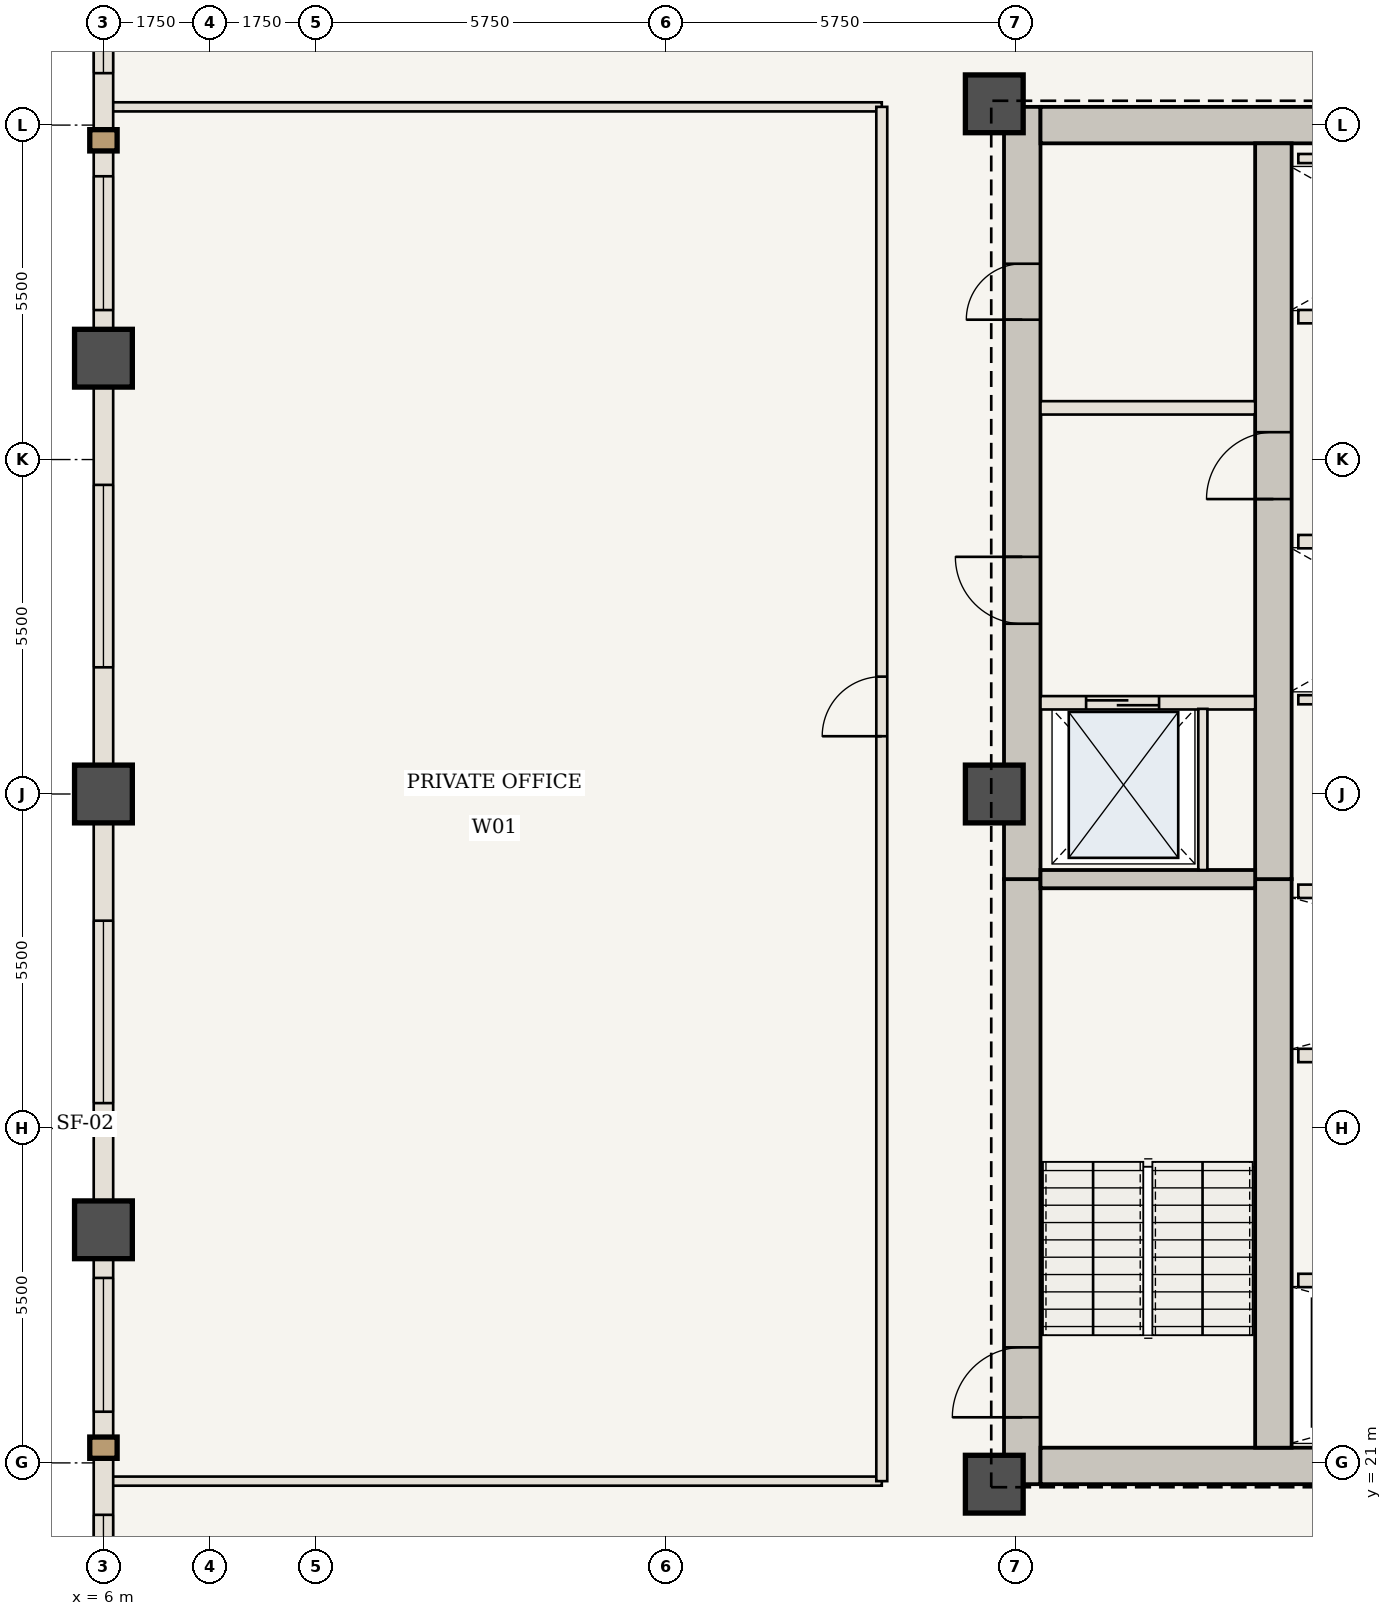
"""IFC4 building model, lengths in metres.
Left out: names, types, materials, properties, quantities, classifications, styles, units other than length and angle.
Written with IfcOpenShell. Run it as: python <this file> out.ifc"""

import sys

from ifc_helpers import new_model, si_unit, direction, frame, frame_2d, origin, origin_2d, place, context, subcontext, project, spatial, rectangle, extrude, element, fill, save


model = new_model("IFC4")
c1 = context("Model", 3, precision=1e-05, world=origin(), true_north=direction((0.0, 1.0)))
c2 = subcontext(c1, "Body", "Model", "MODEL_VIEW")
j1 = project(units=[si_unit("LENGTHUNIT", "METRE"), si_unit("PLANEANGLEUNIT", "RADIAN")], contexts=[c1])
p1 = place(None, origin())
s1 = spatial("IfcSite", under=j1, at=p1, CompositionType="ELEMENT")
p2 = place(p1, origin())
s2 = spatial("IfcBuilding", under=s1, at=p2, CompositionType="ELEMENT")
p3 = place(p2, frame((0.0, 0.0, 156.8)))
s3 = spatial("IfcBuildingStorey", under=s2, at=p3, CompositionType="ELEMENT", Elevation=156.8)
p4 = place(p3, frame((21.11, 20.65, 0.0), z_axis=(0.0, 0.0, 1.0), x_axis=(0.0, 1.0, 0.0)))
e1 = element("IfcWall", 1, at=p4, inside=s3, PredefinedType="SHEAR", context=c2, shape_type="SweptSolid", body=[
    extrude(rectangle(XDim=9.95, YDim=0.6, at=frame_2d((4.975, 0.0))), origin(), (0.0, 0.0, 1.0), 3.85),
])
p5 = place(p4, frame((1.1, 0.0, 0.0)))
e2 = element("IfcOpeningElement", 2, at=p5, cuts=e1, PredefinedType="OPENING", context=c2, shape_type="SweptSolid", body=[
    extrude(rectangle(XDim=1.15, YDim=2.15, at=frame_2d((0.575, 1.075))), frame((0.0, 0.31, 0.0), z_axis=(0.0, -1.0, 0.0), x_axis=(1.0, 0.0, 0.0)), (0.0, 0.0, 1.0), 0.62),
])
p6 = place(p3, frame((21.11, 30.6, 0.0), z_axis=(0.0, 0.0, 1.0), x_axis=(0.0, 1.0, 0.0)))
e3 = element("IfcWall", 3, at=p6, inside=s3, PredefinedType="SHEAR", context=c2, shape_type="SweptSolid", body=[
    extrude(rectangle(XDim=12.7, YDim=0.6, at=frame_2d((6.35, 0.0))), origin(), (0.0, 0.0, 1.0), 3.85),
])
p7 = place(p6, frame((4.2, 0.0, 0.0)))
e4 = element("IfcOpeningElement", 4, at=p7, cuts=e3, PredefinedType="OPENING", context=c2, shape_type="SweptSolid", body=[
    extrude(rectangle(XDim=1.1, YDim=2.15, at=frame_2d((0.55, 1.075))), frame((0.0, 0.31, 0.0), z_axis=(0.0, -1.0, 0.0), x_axis=(1.0, 0.0, 0.0)), (0.0, 0.0, 1.0), 0.62),
])
p8 = place(p6, frame((9.2, 0.0, 0.0)))
e5 = element("IfcOpeningElement", 5, at=p8, cuts=e3, PredefinedType="OPENING", context=c2, shape_type="SweptSolid", body=[
    extrude(rectangle(XDim=0.92, YDim=2.1, at=frame_2d((0.46, 1.05))), frame((0.0, 0.31, 0.0), z_axis=(0.0, -1.0, 0.0), x_axis=(1.0, 0.0, 0.0)), (0.0, 0.0, 1.0), 0.62),
])
p9 = place(p3, frame((21.41, 20.95, 0.0), z_axis=(0.0, 0.0, 1.0), x_axis=(1.0, 0.0, 0.0)))
e6 = element("IfcWall", 6, at=p9, inside=s3, PredefinedType="SHEAR", context=c2, shape_type="SweptSolid", body=[
    extrude(rectangle(XDim=13.74, YDim=0.6, at=frame_2d((6.87, 0.0))), origin(), (0.0, 0.0, 1.0), 3.85),
])
p10 = place(p3, frame((21.41, 43.0, 0.0), z_axis=(0.0, 0.0, 1.0), x_axis=(1.0, 0.0, 0.0)))
e7 = element("IfcWall", 7, at=p10, inside=s3, PredefinedType="SHEAR", context=c2, shape_type="SweptSolid", body=[
    extrude(rectangle(XDim=8.24, YDim=0.6, at=frame_2d((4.12, 0.0))), origin(), (0.0, 0.0, 1.0), 3.85),
])
p11 = place(p3, frame((25.24, 21.25, 0.0), z_axis=(0.0, 0.0, 1.0), x_axis=(0.0, 1.0, 0.0)))
e8 = element("IfcWall", 8, at=p11, inside=s3, PredefinedType="SHEAR", context=c2, shape_type="SweptSolid", body=[
    extrude(rectangle(XDim=9.35, YDim=0.6, at=frame_2d((4.675, 0.0))), origin(), (0.0, 0.0, 1.0), 3.85),
])
p12 = place(p3, frame((25.24, 30.6, 0.0), z_axis=(0.0, 0.0, 1.0), x_axis=(0.0, 1.0, 0.0)))
e9 = element("IfcWall", 9, at=p12, inside=s3, PredefinedType="SHEAR", context=c2, shape_type="SweptSolid", body=[
    extrude(rectangle(XDim=12.1, YDim=0.6, at=frame_2d((6.05, 0.0))), origin(), (0.0, 0.0, 1.0), 3.85),
])
p13 = place(p12, frame((6.25, 0.0, 0.0)))
e10 = element("IfcOpeningElement", 10, at=p13, cuts=e9, PredefinedType="OPENING", context=c2, shape_type="SweptSolid", body=[
    extrude(rectangle(XDim=1.1, YDim=2.15, at=frame_2d((0.55, 1.075))), frame((0.0, 0.31, 0.0), z_axis=(0.0, -1.0, 0.0), x_axis=(1.0, 0.0, 0.0)), (0.0, 0.0, 1.0), 0.62),
])
for number, where, z_axis, x_axis in (
    (11, (20.65, 20.65, 0.0), (0.0, 0.0, 1.0), (1.0, 0.0, 0.0)),
    (12, (20.65, 43.35, 0.0), (0.0, 0.0, 1.0), (1.0, 0.0, 0.0)),
    (13, (20.65, 32.0, 0.0), (0.0, 0.0, 1.0), (1.0, 0.0, 0.0)),
    (14, (6.0, 24.833, 0.0), (0.0, 0.0, 1.0), (1.0, 0.0, 0.0)),
    (15, (6.0, 32.0, 0.0), (0.0, 0.0, 1.0), (1.0, 0.0, 0.0)),
    (16, (6.0, 39.167, 0.0), (0.0, 0.0, 1.0), (1.0, 0.0, 0.0)),
):
    element("IfcColumn", number, at=place(p3, frame(where, z_axis=z_axis, x_axis=x_axis)), inside=s3, PredefinedType="COLUMN", context=c2, shape_type="SweptSolid", body=[
        extrude(rectangle(XDim=0.95, YDim=0.95, at=origin_2d()), origin(), (0.0, 0.0, 1.0), 3.85),
    ])
p14 = place(p3, frame((21.41, 30.6, 0.0), z_axis=(0.0, 0.0, 1.0), x_axis=(1.0, 0.0, 0.0)))
e17 = element("IfcWall", 17, at=p14, inside=s3, PredefinedType="SHEAR", context=c2, shape_type="SweptSolid", body=[
    extrude(rectangle(XDim=3.53, YDim=0.3, at=frame_2d((1.765, 0.0))), origin(), (0.0, 0.0, 1.0), 3.685),
])
p15 = place(p3, frame((21.41, 33.5, 0.0), z_axis=(0.0, 0.0, 1.0), x_axis=(1.0, 0.0, 0.0)))
e18 = element("IfcWall", 18, at=p15, inside=s3, PredefinedType="STANDARD", context=c2, shape_type="SweptSolid", body=[
    extrude(rectangle(XDim=3.53, YDim=0.22, at=frame_2d((1.765, 0.0))), origin(), (0.0, 0.0, 1.0), 3.685),
])
p16 = place(p15, frame((0.75, 0.0, 0.0)))
e19 = element("IfcOpeningElement", 19, at=p16, cuts=e18, PredefinedType="OPENING", context=c2, shape_type="SweptSolid", body=[
    extrude(rectangle(XDim=1.2, YDim=2.2, at=frame_2d((0.6, 1.1))), frame((0.0, 0.12, 0.0), z_axis=(0.0, -1.0, 0.0), x_axis=(1.0, 0.0, 0.0)), (0.0, 0.0, 1.0), 0.24),
])
p17 = place(p3, frame((24.08, 30.75, 0.0), z_axis=(0.0, 0.0, 1.0), x_axis=(0.0, 1.0, 0.0)))
e20 = element("IfcWall", 20, at=p17, inside=s3, PredefinedType="STANDARD", context=c2, shape_type="SweptSolid", body=[
    extrude(rectangle(XDim=2.65, YDim=0.15, at=frame_2d((1.325, 0.0))), origin(), (0.0, 0.0, 1.0), 3.685),
])
p18 = place(p3, frame((21.41, 38.35, 0.0), z_axis=(0.0, 0.0, 1.0), x_axis=(1.0, 0.0, 0.0)))
e21 = element("IfcWall", 21, at=p18, inside=s3, PredefinedType="STANDARD", context=c2, shape_type="SweptSolid", body=[
    extrude(rectangle(XDim=3.53, YDim=0.22, at=frame_2d((1.765, 0.0))), origin(), (0.0, 0.0, 1.0), 3.685),
])
p19 = place(p3, frame((25.65, 24.0, 0.0), z_axis=(0.0, 0.0, 1.0), x_axis=(1.0, 0.0, 0.0)))
e22 = element("IfcWall", 22, at=p19, inside=s3, PredefinedType="STANDARD", context=c2, shape_type="SweptSolid", body=[
    extrude(rectangle(XDim=9.25, YDim=0.22, at=frame_2d((4.625, 0.0))), origin(), (0.0, 0.0, 1.0), 3.685),
])
p20 = place(p19, frame((0.58, 0.0, 0.0)))
e23 = element("IfcOpeningElement", 23, at=p20, cuts=e22, PredefinedType="OPENING", context=c2, shape_type="SweptSolid", body=[
    extrude(rectangle(XDim=1.1, YDim=2.15, at=frame_2d((0.55, 1.075))), frame((0.0, 0.12, 0.0), z_axis=(0.0, -1.0, 0.0), x_axis=(1.0, 0.0, 0.0)), (0.0, 0.0, 1.0), 0.24),
])
p21 = place(p19, frame((2.75, 0.0, 0.0)))
e24 = element("IfcOpeningElement", 24, at=p21, cuts=e22, PredefinedType="OPENING", context=c2, shape_type="SweptSolid", body=[
    extrude(rectangle(XDim=1.1, YDim=2.15, at=frame_2d((0.55, 1.075))), frame((0.0, 0.12, 0.0), z_axis=(0.0, -1.0, 0.0), x_axis=(1.0, 0.0, 0.0)), (0.0, 0.0, 1.0), 0.24),
])
p22 = place(p19, frame((5.05, 0.0, 0.0)))
e25 = element("IfcOpeningElement", 25, at=p22, cuts=e22, PredefinedType="OPENING", context=c2, shape_type="SweptSolid", body=[
    extrude(rectangle(XDim=1.1, YDim=2.15, at=frame_2d((0.55, 1.075))), frame((0.0, 0.12, 0.0), z_axis=(0.0, -1.0, 0.0), x_axis=(1.0, 0.0, 0.0)), (0.0, 0.0, 1.0), 0.24),
])
p23 = place(p19, frame((7.35, 0.0, 0.0)))
e26 = element("IfcOpeningElement", 26, at=p23, cuts=e22, PredefinedType="OPENING", context=c2, shape_type="SweptSolid", body=[
    extrude(rectangle(XDim=1.1, YDim=2.15, at=frame_2d((0.55, 1.075))), frame((0.0, 0.12, 0.0), z_axis=(0.0, -1.0, 0.0), x_axis=(1.0, 0.0, 0.0)), (0.0, 0.0, 1.0), 0.24),
])
for number, where, z_axis, x_axis in (
    (27, (25.65, 27.7, 0.0), (0.0, 0.0, 1.0), (1.0, 0.0, 0.0)),
    (28, (25.65, 30.4, 0.0), (0.0, 0.0, 1.0), (1.0, 0.0, 0.0)),
):
    element("IfcWall", number, at=place(p3, frame(where, z_axis=z_axis, x_axis=x_axis)), inside=s3, PredefinedType="STANDARD", context=c2, shape_type="SweptSolid", body=[
        extrude(rectangle(XDim=9.25, YDim=0.22, at=frame_2d((4.625, 0.0))), origin(), (0.0, 0.0, 1.0), 3.685),
    ])
p24 = place(p3, frame((25.65, 36.15, 0.0), z_axis=(0.0, 0.0, 1.0), x_axis=(1.0, 0.0, 0.0)))
e29 = element("IfcWall", 29, at=p24, inside=s3, PredefinedType="STANDARD", context=c2, shape_type="SweptSolid", body=[
    extrude(rectangle(XDim=4.3, YDim=0.22, at=frame_2d((2.15, 0.0))), origin(), (0.0, 0.0, 1.0), 3.685),
])
p25 = place(p3, frame((25.65, 33.55, 0.0), z_axis=(0.0, 0.0, 1.0), x_axis=(1.0, 0.0, 0.0)))
e30 = element("IfcWall", 30, at=p25, inside=s3, PredefinedType="STANDARD", context=c2, shape_type="SweptSolid", body=[
    extrude(rectangle(XDim=4.2, YDim=0.15, at=frame_2d((2.1, 0.0))), origin(), (0.0, 0.0, 1.0), 3.685),
])
p26 = place(p3, frame((25.65, 39.85, 0.0), z_axis=(0.0, 0.0, 1.0), x_axis=(1.0, 0.0, 0.0)))
e31 = element("IfcWall", 31, at=p26, inside=s3, PredefinedType="STANDARD", context=c2, shape_type="SweptSolid", body=[
    extrude(rectangle(XDim=4.3, YDim=0.22, at=frame_2d((2.15, 0.0))), origin(), (0.0, 0.0, 1.0), 3.685),
])
p27 = place(p3, frame((25.65, 42.45, 0.0), z_axis=(0.0, 0.0, 1.0), x_axis=(1.0, 0.0, 0.0)))
e32 = element("IfcWall", 32, at=p27, inside=s3, PredefinedType="STANDARD", context=c2, shape_type="SweptSolid", body=[
    extrude(rectangle(XDim=4.2, YDim=0.15, at=frame_2d((2.1, 0.0))), origin(), (0.0, 0.0, 1.0), 3.685),
])
for number, where, z_axis, x_axis in (
    (33, (6.06, 20.7, 0.0), (0.0, 0.0, 1.0), (1.0, 0.0, 0.0)),
    (34, (6.06, 43.3, 0.0), (0.0, 0.0, 1.0), (1.0, 0.0, 0.0)),
):
    element("IfcWall", number, at=place(p3, frame(where, z_axis=z_axis, x_axis=x_axis)), inside=s3, PredefinedType="STANDARD", context=c2, shape_type="SweptSolid", body=[
        extrude(rectangle(XDim=12.74, YDim=0.15, at=frame_2d((6.37, 0.0))), origin(), (0.0, 0.0, 1.0), 3.065),
    ])
p28 = place(p3, frame((18.8, 20.7, 0.0), z_axis=(0.0, 0.0, 1.0), x_axis=(0.0, 1.0, 0.0)))
e35 = element("IfcWall", 35, at=p28, inside=s3, PredefinedType="STANDARD", context=c2, shape_type="SweptSolid", body=[
    extrude(rectangle(XDim=22.6, YDim=0.18, at=frame_2d((11.3, 0.0))), origin(), (0.0, 0.0, 1.0), 3.685),
])
p29 = place(p28, frame((12.25, 0.0, 0.0)))
e36 = element("IfcOpeningElement", 36, at=p29, cuts=e35, PredefinedType="OPENING", context=c2, shape_type="SweptSolid", body=[
    extrude(rectangle(XDim=0.98, YDim=2.2, at=frame_2d((0.49, 1.1))), frame((0.0, 0.1, 0.0), z_axis=(0.0, -1.0, 0.0), x_axis=(1.0, 0.0, 0.0)), (0.0, 0.0, 1.0), 0.2),
])
p30 = place(p3, frame((6.0, 17.667, 0.0), z_axis=(0.0, 0.0, 1.0), x_axis=(0.0, 1.0, 0.0)))
e37 = element("IfcWall", 37, at=p30, inside=s3, PredefinedType="USERDEFINED", context=c2, shape_type="SweptSolid", body=[
    extrude(rectangle(XDim=7.167, YDim=0.32, at=frame_2d((3.583, 0.0))), origin(), (0.0, 0.0, 1.0), 2.885),
])
p31 = place(p30, frame((0.879, 0.0, 0.85)))
e38 = element("IfcOpeningElement", 38, at=p31, cuts=e37, PredefinedType="OPENING", context=c2, shape_type="SweptSolid", body=[
    extrude(rectangle(XDim=1.6, YDim=1.835, at=frame_2d((0.8, 0.917))), frame((0.0, 0.17, 0.0), z_axis=(0.0, -1.0, 0.0), x_axis=(1.0, 0.0, 0.0)), (0.0, 0.0, 1.0), 0.34),
])
p32 = place(p30, frame((4.175, 0.0, 0.85)))
e39 = element("IfcOpeningElement", 39, at=p32, cuts=e37, PredefinedType="OPENING", context=c2, shape_type="SweptSolid", body=[
    extrude(rectangle(XDim=2.2, YDim=1.835, at=frame_2d((1.1, 0.917))), frame((0.0, 0.17, 0.0), z_axis=(0.0, -1.0, 0.0), x_axis=(1.0, 0.0, 0.0)), (0.0, 0.0, 1.0), 0.34),
])
p33 = place(p3, frame((6.0, 24.833, 0.0), z_axis=(0.0, 0.0, 1.0), x_axis=(0.0, 1.0, 0.0)))
e40 = element("IfcWall", 40, at=p33, inside=s3, PredefinedType="USERDEFINED", context=c2, shape_type="SweptSolid", body=[
    extrude(rectangle(XDim=7.167, YDim=0.32, at=frame_2d((3.583, 0.0))), origin(), (0.0, 0.0, 1.0), 2.885),
])
p34 = place(p33, frame((2.083, 0.0, 0.85)))
e41 = element("IfcOpeningElement", 41, at=p34, cuts=e40, PredefinedType="OPENING", context=c2, shape_type="SweptSolid", body=[
    extrude(rectangle(XDim=3.0, YDim=1.835, at=frame_2d((1.5, 0.917))), frame((0.0, 0.17, 0.0), z_axis=(0.0, -1.0, 0.0), x_axis=(1.0, 0.0, 0.0)), (0.0, 0.0, 1.0), 0.34),
])
p35 = place(p3, frame((6.0, 32.0, 0.0), z_axis=(0.0, 0.0, 1.0), x_axis=(0.0, 1.0, 0.0)))
e42 = element("IfcWall", 42, at=p35, inside=s3, PredefinedType="USERDEFINED", context=c2, shape_type="SweptSolid", body=[
    extrude(rectangle(XDim=7.167, YDim=0.32, at=frame_2d((3.583, 0.0))), origin(), (0.0, 0.0, 1.0), 2.885),
])
p36 = place(p35, frame((2.083, 0.0, 0.85)))
e43 = element("IfcOpeningElement", 43, at=p36, cuts=e42, PredefinedType="OPENING", context=c2, shape_type="SweptSolid", body=[
    extrude(rectangle(XDim=3.0, YDim=1.835, at=frame_2d((1.5, 0.917))), frame((0.0, 0.17, 0.0), z_axis=(0.0, -1.0, 0.0), x_axis=(1.0, 0.0, 0.0)), (0.0, 0.0, 1.0), 0.34),
])
p37 = place(p3, frame((6.0, 39.167, 0.0), z_axis=(0.0, 0.0, 1.0), x_axis=(0.0, 1.0, 0.0)))
e44 = element("IfcWall", 44, at=p37, inside=s3, PredefinedType="USERDEFINED", context=c2, shape_type="SweptSolid", body=[
    extrude(rectangle(XDim=7.167, YDim=0.32, at=frame_2d((3.583, 0.0))), origin(), (0.0, 0.0, 1.0), 2.885),
])
p38 = place(p37, frame((0.792, 0.0, 0.85)))
e45 = element("IfcOpeningElement", 45, at=p38, cuts=e44, PredefinedType="OPENING", context=c2, shape_type="SweptSolid", body=[
    extrude(rectangle(XDim=2.2, YDim=1.835, at=frame_2d((1.1, 0.917))), frame((0.0, 0.17, 0.0), z_axis=(0.0, -1.0, 0.0), x_axis=(1.0, 0.0, 0.0)), (0.0, 0.0, 1.0), 0.34),
])
p39 = place(p37, frame((4.688, 0.0, 0.85)))
e46 = element("IfcOpeningElement", 46, at=p39, cuts=e44, PredefinedType="OPENING", context=c2, shape_type="SweptSolid", body=[
    extrude(rectangle(XDim=1.6, YDim=1.835, at=frame_2d((0.8, 0.917))), frame((0.0, 0.17, 0.0), z_axis=(0.0, -1.0, 0.0), x_axis=(1.0, 0.0, 0.0)), (0.0, 0.0, 1.0), 0.34),
])
p40 = place(p5, origin())
e47 = element("IfcDoor", 47, at=p40, inside=s3, OperationType="SINGLE_SWING_LEFT", PredefinedType="DOOR", context=c2, shape_type="SweptSolid", body=[
    extrude(rectangle(XDim=1.15, YDim=2.15, at=frame_2d((0.575, 1.075))), frame((0.0, 0.025, 0.0), z_axis=(0.0, -1.0, 0.0), x_axis=(1.0, 0.0, 0.0)), (0.0, 0.0, 1.0), 0.05),
])
fill(e2, e47)
p41 = place(p7, origin())
e48 = element("IfcDoor", 48, at=p41, inside=s3, OperationType="SINGLE_SWING_RIGHT", PredefinedType="DOOR", context=c2, shape_type="SweptSolid", body=[
    extrude(rectangle(XDim=1.1, YDim=2.15, at=frame_2d((0.55, 1.075))), frame((0.0, 0.025, 0.0), z_axis=(0.0, -1.0, 0.0), x_axis=(1.0, 0.0, 0.0)), (0.0, 0.0, 1.0), 0.05),
])
fill(e4, e48)
p42 = place(p13, origin())
e49 = element("IfcDoor", 49, at=p42, inside=s3, OperationType="SINGLE_SWING_LEFT", PredefinedType="DOOR", context=c2, shape_type="SweptSolid", body=[
    extrude(rectangle(XDim=1.1, YDim=2.15, at=frame_2d((0.55, 1.075))), frame((0.0, 0.025, 0.0), z_axis=(0.0, -1.0, 0.0), x_axis=(1.0, 0.0, 0.0)), (0.0, 0.0, 1.0), 0.05),
])
fill(e10, e49)
p43 = place(p8, origin())
e50 = element("IfcDoor", 50, at=p43, inside=s3, OperationType="SINGLE_SWING_LEFT", PredefinedType="DOOR", context=c2, shape_type="SweptSolid", body=[
    extrude(rectangle(XDim=0.92, YDim=2.1, at=frame_2d((0.46, 1.05))), frame((0.0, 0.025, 0.0), z_axis=(0.0, -1.0, 0.0), x_axis=(1.0, 0.0, 0.0)), (0.0, 0.0, 1.0), 0.05),
])
fill(e5, e50)
p44 = place(p16, origin())
e51 = element("IfcDoor", 51, at=p44, inside=s3, OperationType="DOUBLE_DOOR_SLIDING", PredefinedType="DOOR", context=c2, shape_type="SweptSolid", body=[
    extrude(rectangle(XDim=1.2, YDim=2.2, at=frame_2d((0.6, 1.1))), frame((0.0, 0.025, 0.0), z_axis=(0.0, -1.0, 0.0), x_axis=(1.0, 0.0, 0.0)), (0.0, 0.0, 1.0), 0.05),
])
fill(e19, e51)
p45 = place(p29, origin())
e52 = element("IfcDoor", 52, at=p45, inside=s3, OperationType="SINGLE_SWING_LEFT", PredefinedType="DOOR", context=c2, shape_type="SweptSolid", body=[
    extrude(rectangle(XDim=0.98, YDim=2.2, at=frame_2d((0.49, 1.1))), frame((0.0, 0.025, 0.0), z_axis=(0.0, -1.0, 0.0), x_axis=(1.0, 0.0, 0.0)), (0.0, 0.0, 1.0), 0.05),
])
fill(e36, e52)
p46 = place(p31, origin())
e53 = element("IfcWindow", 53, at=p46, inside=s3, PartitioningType="SINGLE_PANEL", PredefinedType="WINDOW", context=c2, shape_type="SweptSolid", body=[
    extrude(rectangle(XDim=1.6, YDim=1.835, at=frame_2d((0.8, 0.917))), frame((0.0, 0.03, 0.0), z_axis=(0.0, -1.0, 0.0), x_axis=(1.0, 0.0, 0.0)), (0.0, 0.0, 1.0), 0.06),
])
fill(e38, e53)
p47 = place(p32, origin())
e54 = element("IfcWindow", 54, at=p47, inside=s3, PartitioningType="SINGLE_PANEL", PredefinedType="WINDOW", context=c2, shape_type="SweptSolid", body=[
    extrude(rectangle(XDim=2.2, YDim=1.835, at=frame_2d((1.1, 0.917))), frame((0.0, 0.03, 0.0), z_axis=(0.0, -1.0, 0.0), x_axis=(1.0, 0.0, 0.0)), (0.0, 0.0, 1.0), 0.06),
])
fill(e39, e54)
p48 = place(p34, origin())
e55 = element("IfcWindow", 55, at=p48, inside=s3, PartitioningType="SINGLE_PANEL", PredefinedType="WINDOW", context=c2, shape_type="SweptSolid", body=[
    extrude(rectangle(XDim=3.0, YDim=1.835, at=frame_2d((1.5, 0.917))), frame((0.0, 0.03, 0.0), z_axis=(0.0, -1.0, 0.0), x_axis=(1.0, 0.0, 0.0)), (0.0, 0.0, 1.0), 0.06),
])
fill(e41, e55)
p49 = place(p36, origin())
e56 = element("IfcWindow", 56, at=p49, inside=s3, PartitioningType="SINGLE_PANEL", PredefinedType="WINDOW", context=c2, shape_type="SweptSolid", body=[
    extrude(rectangle(XDim=3.0, YDim=1.835, at=frame_2d((1.5, 0.917))), frame((0.0, 0.03, 0.0), z_axis=(0.0, -1.0, 0.0), x_axis=(1.0, 0.0, 0.0)), (0.0, 0.0, 1.0), 0.06),
])
fill(e43, e56)
p50 = place(p38, origin())
e57 = element("IfcWindow", 57, at=p50, inside=s3, PartitioningType="SINGLE_PANEL", PredefinedType="WINDOW", context=c2, shape_type="SweptSolid", body=[
    extrude(rectangle(XDim=2.2, YDim=1.835, at=frame_2d((1.1, 0.917))), frame((0.0, 0.03, 0.0), z_axis=(0.0, -1.0, 0.0), x_axis=(1.0, 0.0, 0.0)), (0.0, 0.0, 1.0), 0.06),
])
fill(e45, e57)
p51 = place(p39, origin())
e58 = element("IfcWindow", 58, at=p51, inside=s3, PartitioningType="SINGLE_PANEL", PredefinedType="WINDOW", context=c2, shape_type="SweptSolid", body=[
    extrude(rectangle(XDim=1.6, YDim=1.835, at=frame_2d((0.8, 0.917))), frame((0.0, 0.03, 0.0), z_axis=(0.0, -1.0, 0.0), x_axis=(1.0, 0.0, 0.0)), (0.0, 0.0, 1.0), 0.06),
])
fill(e46, e58)
save(model, sys.argv[1])
